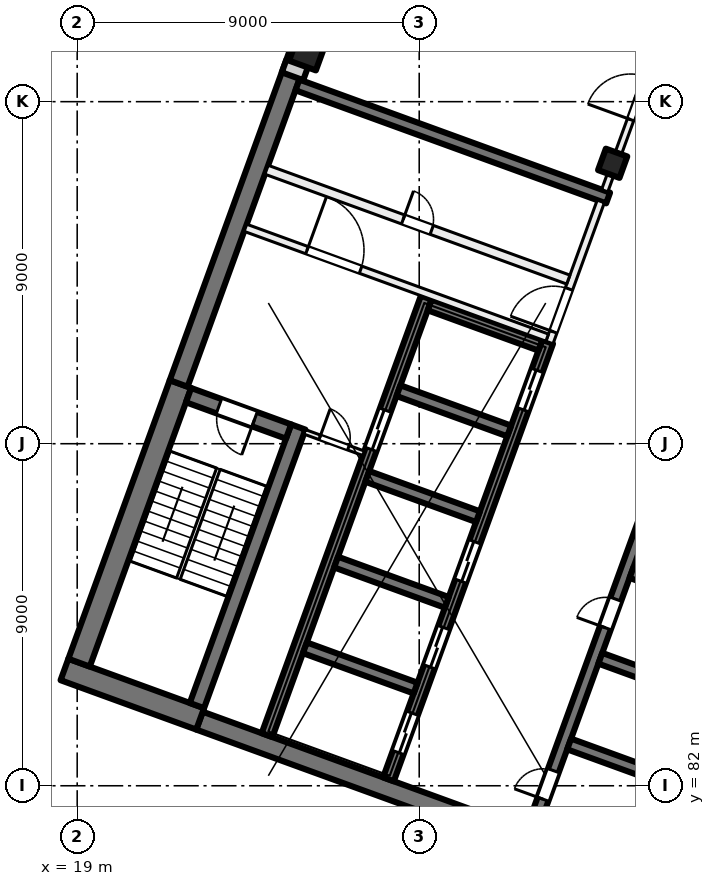
"""IFC4 building model, lengths in metres.
Left out: names, types, materials, properties, quantities, classifications, styles, units other than length and angle.
Written with IfcOpenShell. Run it as: python <this file> out.ifc"""

import sys

from ifc_helpers import new_model, si_unit, direction, frame, frame_2d, origin, origin_2d, place, context, subcontext, project, spatial, rectangle, extrude, element, fill, save


model = new_model("IFC4")
c1 = context("Model", 3, precision=1e-05, world=origin(), true_north=direction((0.0, 1.0)))
c2 = subcontext(c1, "Body", "Model", "MODEL_VIEW")
j1 = project(units=[si_unit("LENGTHUNIT", "METRE"), si_unit("PLANEANGLEUNIT", "RADIAN")], contexts=[c1])
p1 = place(None, origin())
s1 = spatial("IfcSite", under=j1, at=p1, CompositionType="ELEMENT")
p2 = place(p1, origin())
s2 = spatial("IfcBuilding", under=s1, at=p2, CompositionType="ELEMENT")
p3 = place(p2, frame((0.0, 0.0, 220.0)))
s3 = spatial("IfcBuildingStorey", under=s2, at=p3, CompositionType="ELEMENT", Elevation=220.0)
p4 = place(p3, frame((33.091, 98.379, 0.0), z_axis=(0.0, 0.0, 1.0), x_axis=(-0.342020143326, -0.939692620786, 0.0)))
e1 = element("IfcColumn", 1, at=p4, inside=s3, PredefinedType="COLUMN", context=c2, shape_type="SweptSolid", body=[
    extrude(rectangle(XDim=0.6, YDim=0.6, at=origin_2d()), origin(), (0.0, 0.0, 1.0), 4.0),
])
p5 = place(p3, frame((25.056, 101.303, 0.0), z_axis=(0.0, 0.0, 1.0), x_axis=(-0.342020143326, -0.939692620786, 0.0)))
e2 = element("IfcColumn", 2, at=p5, inside=s3, PredefinedType="COLUMN", context=c2, shape_type="SweptSolid", body=[
    extrude(rectangle(XDim=0.75, YDim=0.75, at=origin_2d()), origin(), (0.0, 0.0, 1.0), 4.0),
])
p6 = place(p3, frame((35.75, 78.788, 0.0), z_axis=(0.0, 0.0, 1.0), x_axis=(-0.939692894512, 0.342019391267, 0.0)))
e3 = element("IfcWall", 3, at=p6, inside=s3, PredefinedType="SHEAR", context=c2, shape_type="SweptSolid", body=[
    extrude(rectangle(XDim=14.4, YDim=0.5, at=frame_2d((7.2, 0.0))), origin(), (0.0, 0.0, 1.0), 4.0),
])
p7 = place(p3, frame((22.236, 83.76, 0.0), z_axis=(0.0, 0.0, 1.0), x_axis=(-0.939680822529, 0.342052557032, 0.0)))
e4 = element("IfcWall", 4, at=p7, inside=s3, PredefinedType="SHEAR", context=c2, shape_type="SweptSolid", body=[
    extrude(rectangle(XDim=3.8, YDim=0.6, at=frame_2d((1.9, 0.0))), origin(), (0.0, 0.0, 1.0), 4.0),
])
p8 = place(p3, frame((19.05, 85.239, 0.0), z_axis=(0.0, 0.0, 1.0), x_axis=(0.342016982193, 0.939693771338, 0.0)))
e5 = element("IfcWall", 5, at=p8, inside=s3, PredefinedType="SHEAR", context=c2, shape_type="SweptSolid", body=[
    extrude(rectangle(XDim=7.8, YDim=0.6, at=frame_2d((3.9, 0.0))), origin(), (0.0, 0.0, 1.0), 4.0),
])
p9 = place(p3, frame((21.67, 92.585, 0.0), z_axis=(0.0, 0.0, 1.0), x_axis=(0.342035714298, 0.93968695327, 0.0)))
e6 = element("IfcWall", 6, at=p9, inside=s3, PredefinedType="SHEAR", context=c2, shape_type="SweptSolid", body=[
    extrude(rectangle(XDim=8.975, YDim=0.5, at=frame_2d((4.488, 0.0))), origin(), (0.0, 0.0, 1.0), 4.0),
])
p10 = place(p3, frame((22.15, 84.11, 0.0), z_axis=(0.0, 0.0, 1.0), x_axis=(0.342016982193, 0.939693771338, 0.0)))
e7 = element("IfcWall", 7, at=p10, inside=s3, PredefinedType="SHEAR", context=c2, shape_type="SweptSolid", body=[
    extrude(rectangle(XDim=7.8, YDim=0.4, at=frame_2d((3.9, 0.0))), origin(), (0.0, 0.0, 1.0), 4.0),
])
p11 = place(p3, frame((24.562, 91.32, 0.0), z_axis=(0.0, 0.0, 1.0), x_axis=(-0.939717030584, 0.341953070509, 0.0)))
e8 = element("IfcWall", 8, at=p11, inside=s3, PredefinedType="SHEAR", context=c2, shape_type="SweptSolid", body=[
    extrude(rectangle(XDim=2.8, YDim=0.4, at=frame_2d((1.4, 0.0))), origin(), (0.0, 0.0, 1.0), 4.0),
])
p12 = place(p11, frame((0.95, 0.0, 0.0)))
e9 = element("IfcOpeningElement", 9, at=p12, cuts=e8, PredefinedType="OPENING", context=c2, shape_type="SweptSolid", body=[
    extrude(rectangle(XDim=1.0, YDim=2.1, at=frame_2d((0.5, 1.05))), frame((0.0, 0.21, 0.0), z_axis=(0.0, -1.0, 0.0), x_axis=(1.0, 0.0, 0.0)), (0.0, 0.0, 1.0), 0.42),
])
p13 = place(p3, frame((30.949, 80.801, 0.0), z_axis=(0.0, 0.0, 1.0), x_axis=(0.342016684409, 0.939693879721, 0.0)))
e10 = element("IfcWall", 10, at=p13, inside=s3, PredefinedType="SHEAR", context=c2, shape_type="SweptSolid", body=[
    extrude(rectangle(XDim=12.25, YDim=0.3, at=frame_2d((6.125, 0.0))), origin(), (0.0, 0.0, 1.0), 4.0),
])
p14 = place(p13, frame((0.9, 0.0, 0.0)))
e11 = element("IfcOpeningElement", 11, at=p14, cuts=e10, PredefinedType="OPENING", context=c2, shape_type="SweptSolid", body=[
    extrude(rectangle(XDim=0.8, YDim=2.1, at=frame_2d((0.4, 1.05))), frame((0.0, 0.16, 0.0), z_axis=(0.0, -1.0, 0.0), x_axis=(1.0, 0.0, 0.0)), (0.0, 0.0, 1.0), 0.32),
])
p15 = place(p13, frame((5.7, 0.0, 0.0)))
e12 = element("IfcOpeningElement", 12, at=p15, cuts=e10, PredefinedType="OPENING", context=c2, shape_type="SweptSolid", body=[
    extrude(rectangle(XDim=0.8, YDim=2.1, at=frame_2d((0.4, 1.05))), frame((0.0, 0.16, 0.0), z_axis=(0.0, -1.0, 0.0), x_axis=(1.0, 0.0, 0.0)), (0.0, 0.0, 1.0), 0.32),
])
p16 = place(p3, frame((34.858, 82.039, 0.0), z_axis=(0.0, 0.0, 1.0), x_axis=(-0.939689908313, 0.342027595692, 0.0)))
e13 = element("IfcWall", 13, at=p16, inside=s3, PredefinedType="SHEAR", context=c2, shape_type="SweptSolid", body=[
    extrude(rectangle(XDim=3.1, YDim=0.3, at=frame_2d((1.55, 0.0))), origin(), (0.0, 0.0, 1.0), 4.0),
])
p17 = place(p3, frame((35.679, 84.294, 0.0), z_axis=(0.0, 0.0, 1.0), x_axis=(-0.939706007505, 0.341983361377, 0.0)))
e14 = element("IfcWall", 14, at=p17, inside=s3, PredefinedType="SHEAR", context=c2, shape_type="SweptSolid", body=[
    extrude(rectangle(XDim=3.1, YDim=0.3, at=frame_2d((1.55, 0.0))), origin(), (0.0, 0.0, 1.0), 4.0),
])
p18 = place(p3, frame((36.5, 86.549, 0.0), z_axis=(0.0, 0.0, 1.0), x_axis=(-0.939689908313, 0.342027595692, 0.0)))
e15 = element("IfcWall", 15, at=p18, inside=s3, PredefinedType="SHEAR", context=c2, shape_type="SweptSolid", body=[
    extrude(rectangle(XDim=3.1, YDim=0.3, at=frame_2d((1.55, 0.0))), origin(), (0.0, 0.0, 1.0), 4.0),
])
p19 = place(p3, frame((27.191, 82.169, 0.0), z_axis=(0.0, 0.0, 1.0), x_axis=(0.342016684409, 0.939693879721, 0.0)))
e16 = element("IfcWall", 16, at=p19, inside=s3, PredefinedType="SHEAR", context=c2, shape_type="SweptSolid", body=[
    extrude(rectangle(XDim=12.25, YDim=0.3, at=frame_2d((6.125, 0.0))), origin(), (0.0, 0.0, 1.0), 4.0),
])
p20 = place(p19, frame((0.75, 0.0, 0.0)))
e17 = element("IfcOpeningElement", 17, at=p20, cuts=e16, PredefinedType="OPENING", context=c2, shape_type="SweptSolid", body=[
    extrude(rectangle(XDim=1.1, YDim=2.1, at=frame_2d((0.55, 1.05))), frame((0.0, 0.16, 0.0), z_axis=(0.0, -1.0, 0.0), x_axis=(1.0, 0.0, 0.0)), (0.0, 0.0, 1.0), 0.32),
])
p21 = place(p19, frame((3.15, 0.0, 0.0)))
e18 = element("IfcOpeningElement", 18, at=p21, cuts=e16, PredefinedType="OPENING", context=c2, shape_type="SweptSolid", body=[
    extrude(rectangle(XDim=1.1, YDim=2.1, at=frame_2d((0.55, 1.05))), frame((0.0, 0.16, 0.0), z_axis=(0.0, -1.0, 0.0), x_axis=(1.0, 0.0, 0.0)), (0.0, 0.0, 1.0), 0.32),
])
p22 = place(p19, frame((5.55, 0.0, 0.0)))
e19 = element("IfcOpeningElement", 19, at=p22, cuts=e16, PredefinedType="OPENING", context=c2, shape_type="SweptSolid", body=[
    extrude(rectangle(XDim=1.1, YDim=2.1, at=frame_2d((0.55, 1.05))), frame((0.0, 0.16, 0.0), z_axis=(0.0, -1.0, 0.0), x_axis=(1.0, 0.0, 0.0)), (0.0, 0.0, 1.0), 0.32),
])
p23 = place(p19, frame((10.35, 0.0, 0.0)))
e20 = element("IfcOpeningElement", 20, at=p23, cuts=e16, PredefinedType="OPENING", context=c2, shape_type="SweptSolid", body=[
    extrude(rectangle(XDim=1.1, YDim=2.1, at=frame_2d((0.55, 1.05))), frame((0.0, 0.16, 0.0), z_axis=(0.0, -1.0, 0.0), x_axis=(1.0, 0.0, 0.0)), (0.0, 0.0, 1.0), 0.32),
])
p24 = place(p3, frame((23.996, 83.332, 0.0), z_axis=(0.0, 0.0, 1.0), x_axis=(0.342016684409, 0.939693879721, 0.0)))
e21 = element("IfcWall", 21, at=p24, inside=s3, PredefinedType="SHEAR", context=c2, shape_type="SweptSolid", body=[
    extrude(rectangle(XDim=12.25, YDim=0.3, at=frame_2d((6.125, 0.0))), origin(), (0.0, 0.0, 1.0), 4.0),
])
p25 = place(p24, frame((8.0, 0.0, 0.0)))
e22 = element("IfcOpeningElement", 22, at=p25, cuts=e21, PredefinedType="OPENING", context=c2, shape_type="SweptSolid", body=[
    extrude(rectangle(XDim=1.1, YDim=2.1, at=frame_2d((0.55, 1.05))), frame((0.0, 0.16, 0.0), z_axis=(0.0, -1.0, 0.0), x_axis=(1.0, 0.0, 0.0)), (0.0, 0.0, 1.0), 0.32),
])
for number, where, z_axis, x_axis in (
    (23, (27.905, 84.57, 0.0), (0.0, 0.0, 1.0), (-0.94, 0.342, 0.0)),
    (24, (28.726, 86.825, 0.0), (0.0, 0.0, 1.0), (-0.94, 0.342, 0.0)),
    (25, (29.546, 89.08, 0.0), (0.0, 0.0, 1.0), (-0.94, 0.342, 0.0)),
):
    element("IfcWall", number, at=place(p3, frame(where, z_axis=z_axis, x_axis=x_axis)), inside=s3, PredefinedType="SHEAR", context=c2, shape_type="SweptSolid", body=[
        extrude(rectangle(XDim=3.1, YDim=0.3, at=frame_2d((1.55, 0.0))), origin(), (0.0, 0.0, 1.0), 4.0),
    ])
for number, where, z_axis, x_axis in (
    (26, (30.367, 91.336, 0.0), (0.0, 0.0, 1.0), (-0.94, 0.342, 0.0)),
    (27, (31.188, 93.591, 0.0), (0.0, 0.0, 1.0), (-0.94, 0.342, 0.0)),
):
    element("IfcWall", number, at=place(p3, frame(where, z_axis=z_axis, x_axis=x_axis)), inside=s3, PredefinedType="SHEAR", context=c2, shape_type="SweptSolid", body=[
        extrude(rectangle(XDim=3.1, YDim=0.3, at=frame_2d((1.55, 0.0))), origin(), (0.0, 0.0, 1.0), 4.0),
    ])
p26 = place(p3, frame((32.971, 97.465, 0.0), z_axis=(0.0, 0.0, 1.0), x_axis=(-0.939695066972, 0.34201342241, 0.0)))
e28 = element("IfcWall", 28, at=p26, inside=s3, PredefinedType="SHEAR", context=c2, shape_type="SweptSolid", body=[
    extrude(rectangle(XDim=8.7, YDim=0.3, at=frame_2d((4.35, 0.0))), origin(), (0.0, 0.0, 1.0), 4.0),
])
p27 = place(p3, frame((24.666, 100.669, 0.0), z_axis=(0.0, 0.0, 1.0), x_axis=(0.34201964167, 0.939692803373, 0.0)))
e29 = element("IfcWall", 29, at=p27, inside=s3, PredefinedType="SOLIDWALL", context=c2, shape_type="SweptSolid", body=[
    extrude(rectangle(XDim=32.884, YDim=0.6, at=frame_2d((16.442, 0.0))), origin(), (0.0, 0.0, 1.0), 3.625),
])
p28 = place(p27, frame((1.48, 0.0, 0.9)))
e30 = element("IfcOpeningElement", 30, at=p28, cuts=e29, PredefinedType="OPENING", context=c2, shape_type="SweptSolid", body=[
    extrude(rectangle(XDim=3.0, YDim=2.4, at=frame_2d((1.5, 1.2))), frame((0.0, 0.31, 0.0), z_axis=(0.0, -1.0, 0.0), x_axis=(1.0, 0.0, 0.0)), (0.0, 0.0, 1.0), 0.62),
])
p29 = place(p27, frame((5.98, 0.0, 0.9)))
e31 = element("IfcOpeningElement", 31, at=p29, cuts=e29, PredefinedType="OPENING", context=c2, shape_type="SweptSolid", body=[
    extrude(rectangle(XDim=3.0, YDim=2.4, at=frame_2d((1.5, 1.2))), frame((0.0, 0.31, 0.0), z_axis=(0.0, -1.0, 0.0), x_axis=(1.0, 0.0, 0.0)), (0.0, 0.0, 1.0), 0.62),
])
p30 = place(p27, frame((10.48, 0.0, 0.9)))
e32 = element("IfcOpeningElement", 32, at=p30, cuts=e29, PredefinedType="OPENING", context=c2, shape_type="SweptSolid", body=[
    extrude(rectangle(XDim=3.0, YDim=2.4, at=frame_2d((1.5, 1.2))), frame((0.0, 0.31, 0.0), z_axis=(0.0, -1.0, 0.0), x_axis=(1.0, 0.0, 0.0)), (0.0, 0.0, 1.0), 0.62),
])
p31 = place(p27, frame((14.98, 0.0, 0.9)))
e33 = element("IfcOpeningElement", 33, at=p31, cuts=e29, PredefinedType="OPENING", context=c2, shape_type="SweptSolid", body=[
    extrude(rectangle(XDim=3.0, YDim=2.4, at=frame_2d((1.5, 1.2))), frame((0.0, 0.31, 0.0), z_axis=(0.0, -1.0, 0.0), x_axis=(1.0, 0.0, 0.0)), (0.0, 0.0, 1.0), 0.62),
])
p32 = place(p27, frame((19.48, 0.0, 0.9)))
e34 = element("IfcOpeningElement", 34, at=p32, cuts=e29, PredefinedType="OPENING", context=c2, shape_type="SweptSolid", body=[
    extrude(rectangle(XDim=3.0, YDim=2.4, at=frame_2d((1.5, 1.2))), frame((0.0, 0.31, 0.0), z_axis=(0.0, -1.0, 0.0), x_axis=(1.0, 0.0, 0.0)), (0.0, 0.0, 1.0), 0.62),
])
p33 = place(p27, frame((23.98, 0.0, 0.9)))
e35 = element("IfcOpeningElement", 35, at=p33, cuts=e29, PredefinedType="OPENING", context=c2, shape_type="SweptSolid", body=[
    extrude(rectangle(XDim=3.0, YDim=2.4, at=frame_2d((1.5, 1.2))), frame((0.0, 0.31, 0.0), z_axis=(0.0, -1.0, 0.0), x_axis=(1.0, 0.0, 0.0)), (0.0, 0.0, 1.0), 0.62),
])
p34 = place(p27, frame((28.48, 0.0, 0.9)))
e36 = element("IfcOpeningElement", 36, at=p34, cuts=e29, PredefinedType="OPENING", context=c2, shape_type="SweptSolid", body=[
    extrude(rectangle(XDim=3.0, YDim=2.4, at=frame_2d((1.5, 1.2))), frame((0.0, 0.31, 0.0), z_axis=(0.0, -1.0, 0.0), x_axis=(1.0, 0.0, 0.0)), (0.0, 0.0, 1.0), 0.62),
])
p35 = place(p3, frame((31.427, 93.663, 0.0), z_axis=(0.0, 0.0, 1.0), x_axis=(0.342030870568, 0.93968871632, 0.0)))
e37 = element("IfcWall", 37, at=p35, inside=s3, PredefinedType="PARTITIONING", context=c2, shape_type="SweptSolid", body=[
    extrude(rectangle(XDim=3.95, YDim=0.2, at=frame_2d((1.975, 0.0))), origin(), (0.0, 0.0, 1.0), 3.625),
])
p36 = place(p35, frame((0.3, 0.0, 0.0)))
e38 = element("IfcOpeningElement", 38, at=p36, cuts=e37, PredefinedType="OPENING", context=c2, shape_type="SweptSolid", body=[
    extrude(rectangle(XDim=1.2, YDim=2.1, at=frame_2d((0.6, 1.05))), frame((0.0, 0.11, 0.0), z_axis=(0.0, -1.0, 0.0), x_axis=(1.0, 0.0, 0.0)), (0.0, 0.0, 1.0), 0.22),
])
p37 = place(p3, frame((23.427, 96.682, 0.0), z_axis=(0.0, 0.0, 1.0), x_axis=(0.939690465531, -0.342026064782, 0.0)))
e39 = element("IfcWall", 39, at=p37, inside=s3, PredefinedType="PARTITIONING", context=c2, shape_type="SweptSolid", body=[
    extrude(rectangle(XDim=8.45, YDim=0.2, at=frame_2d((4.225, 0.0))), origin(), (0.0, 0.0, 1.0), 3.625),
])
p38 = place(p37, frame((1.725, 0.0, 0.0)))
e40 = element("IfcOpeningElement", 40, at=p38, cuts=e39, PredefinedType="OPENING", context=c2, shape_type="SweptSolid", body=[
    extrude(rectangle(XDim=1.5, YDim=2.1, at=frame_2d((0.75, 1.05))), frame((0.0, 0.11, 0.0), z_axis=(0.0, -1.0, 0.0), x_axis=(1.0, 0.0, 0.0)), (0.0, 0.0, 1.0), 0.22),
])
p39 = place(p3, frame((23.983, 98.208, 0.0), z_axis=(0.0, 0.0, 1.0), x_axis=(0.939699751196, -0.342000552051, 0.0)))
e41 = element("IfcWall", 41, at=p39, inside=s3, PredefinedType="PARTITIONING", context=c2, shape_type="SweptSolid", body=[
    extrude(rectangle(XDim=8.45, YDim=0.25, at=frame_2d((4.225, 0.0))), origin(), (0.0, 0.0, 1.0), 3.625),
])
p40 = place(p39, frame((3.825, 0.0, 0.0)))
e42 = element("IfcOpeningElement", 42, at=p40, cuts=e41, PredefinedType="OPENING", context=c2, shape_type="SweptSolid", body=[
    extrude(rectangle(XDim=0.8, YDim=2.1, at=frame_2d((0.4, 1.05))), frame((0.0, 0.135, 0.0), z_axis=(0.0, -1.0, 0.0), x_axis=(1.0, 0.0, 0.0)), (0.0, 0.0, 1.0), 0.27),
])
p41 = place(p3, frame((24.985, 91.312, 0.0), z_axis=(0.0, 0.0, 1.0), x_axis=(0.939719959755, -0.341945020783, 0.0)))
e43 = element("IfcWall", 43, at=p41, inside=s3, PredefinedType="PARTITIONING", context=c2, shape_type="SweptSolid", body=[
    extrude(rectangle(XDim=1.65, YDim=0.125, at=frame_2d((0.825, 0.0))), origin(), (0.0, 0.0, 1.0), 3.625),
])
p42 = place(p41, frame((0.425, 0.0, 0.0)))
e44 = element("IfcOpeningElement", 44, at=p42, cuts=e43, PredefinedType="OPENING", context=c2, shape_type="SweptSolid", body=[
    extrude(rectangle(XDim=0.8, YDim=2.1, at=frame_2d((0.4, 1.05))), frame((0.0, 0.073, 0.0), z_axis=(0.0, -1.0, 0.0), x_axis=(1.0, 0.0, 0.0)), (0.0, 0.0, 1.0), 0.145),
])
p43 = place(p3, frame((32.881, 97.657, 0.0), z_axis=(0.0, 0.0, 1.0), x_axis=(0.342058204353, 0.939678766832, 0.0)))
e45 = element("IfcWall", 45, at=p43, inside=s3, PredefinedType="PARTITIONING", context=c2, shape_type="SweptSolid", body=[
    extrude(rectangle(XDim=5.163, YDim=0.175, at=frame_2d((2.581, 0.0))), origin(), (0.0, 0.0, 1.0), 3.625),
])
p44 = place(p43, frame((1.991, 0.0, 0.0)))
e46 = element("IfcOpeningElement", 46, at=p44, cuts=e45, PredefinedType="OPENING", context=c2, shape_type="SweptSolid", body=[
    extrude(rectangle(XDim=1.2, YDim=2.1, at=frame_2d((0.6, 1.05))), frame((0.0, 0.097, 0.0), z_axis=(0.0, -1.0, 0.0), x_axis=(1.0, 0.0, 0.0)), (0.0, 0.0, 1.0), 0.195),
])
p45 = place(p20, origin())
e47 = element("IfcDoor", 47, at=p45, inside=s3, OperationType="DOUBLE_DOOR_SLIDING", PredefinedType="DOOR", context=c2, shape_type="SweptSolid", body=[
    extrude(rectangle(XDim=1.1, YDim=2.1, at=frame_2d((0.55, 1.05))), frame((0.0, 0.025, 0.0), z_axis=(0.0, -1.0, 0.0), x_axis=(1.0, 0.0, 0.0)), (0.0, 0.0, 1.0), 0.05),
])
fill(e17, e47)
p46 = place(p21, origin())
e48 = element("IfcDoor", 48, at=p46, inside=s3, OperationType="DOUBLE_DOOR_SLIDING", PredefinedType="DOOR", context=c2, shape_type="SweptSolid", body=[
    extrude(rectangle(XDim=1.1, YDim=2.1, at=frame_2d((0.55, 1.05))), frame((0.0, 0.025, 0.0), z_axis=(0.0, -1.0, 0.0), x_axis=(1.0, 0.0, 0.0)), (0.0, 0.0, 1.0), 0.05),
])
fill(e18, e48)
p47 = place(p22, origin())
e49 = element("IfcDoor", 49, at=p47, inside=s3, OperationType="DOUBLE_DOOR_SLIDING", PredefinedType="DOOR", context=c2, shape_type="SweptSolid", body=[
    extrude(rectangle(XDim=1.1, YDim=2.1, at=frame_2d((0.55, 1.05))), frame((0.0, 0.025, 0.0), z_axis=(0.0, -1.0, 0.0), x_axis=(1.0, 0.0, 0.0)), (0.0, 0.0, 1.0), 0.05),
])
fill(e19, e49)
p48 = place(p23, origin())
e50 = element("IfcDoor", 50, at=p48, inside=s3, OperationType="DOUBLE_DOOR_SLIDING", PredefinedType="DOOR", context=c2, shape_type="SweptSolid", body=[
    extrude(rectangle(XDim=1.1, YDim=2.1, at=frame_2d((0.55, 1.05))), frame((0.0, 0.025, 0.0), z_axis=(0.0, -1.0, 0.0), x_axis=(1.0, 0.0, 0.0)), (0.0, 0.0, 1.0), 0.05),
])
fill(e20, e50)
p49 = place(p14, origin())
e51 = element("IfcDoor", 51, at=p49, inside=s3, OperationType="SINGLE_SWING_LEFT", PredefinedType="DOOR", context=c2, shape_type="SweptSolid", body=[
    extrude(rectangle(XDim=0.8, YDim=2.1, at=frame_2d((0.4, 1.05))), frame((0.0, 0.025, 0.0), z_axis=(0.0, -1.0, 0.0), x_axis=(1.0, 0.0, 0.0)), (0.0, 0.0, 1.0), 0.05),
])
fill(e11, e51)
p50 = place(p15, origin())
e52 = element("IfcDoor", 52, at=p50, inside=s3, OperationType="SINGLE_SWING_RIGHT", PredefinedType="DOOR", context=c2, shape_type="SweptSolid", body=[
    extrude(rectangle(XDim=0.8, YDim=2.1, at=frame_2d((0.4, 1.05))), frame((0.0, 0.025, 0.0), z_axis=(0.0, -1.0, 0.0), x_axis=(1.0, 0.0, 0.0)), (0.0, 0.0, 1.0), 0.05),
])
fill(e12, e52)
p51 = place(p36, origin())
e53 = element("IfcDoor", 53, at=p51, inside=s3, OperationType="DOUBLE_DOOR_SINGLE_SWING", PredefinedType="DOOR", context=c2, shape_type="SweptSolid", body=[
    extrude(rectangle(XDim=1.2, YDim=2.1, at=frame_2d((0.6, 1.05))), frame((0.0, 0.025, 0.0), z_axis=(0.0, -1.0, 0.0), x_axis=(1.0, 0.0, 0.0)), (0.0, 0.0, 1.0), 0.05),
])
fill(e38, e53)
p52 = place(p38, origin())
e54 = element("IfcDoor", 54, at=p52, inside=s3, OperationType="DOUBLE_DOOR_SINGLE_SWING", PredefinedType="DOOR", context=c2, shape_type="SweptSolid", body=[
    extrude(rectangle(XDim=1.5, YDim=2.1, at=frame_2d((0.75, 1.05))), frame((0.0, 0.025, 0.0), z_axis=(0.0, -1.0, 0.0), x_axis=(1.0, 0.0, 0.0)), (0.0, 0.0, 1.0), 0.05),
])
fill(e40, e54)
p53 = place(p12, origin())
e55 = element("IfcDoor", 55, at=p53, inside=s3, OperationType="SINGLE_SWING_LEFT", PredefinedType="DOOR", context=c2, shape_type="SweptSolid", body=[
    extrude(rectangle(XDim=1.0, YDim=2.1, at=frame_2d((0.5, 1.05))), frame((0.0, 0.025, 0.0), z_axis=(0.0, -1.0, 0.0), x_axis=(1.0, 0.0, 0.0)), (0.0, 0.0, 1.0), 0.05),
])
fill(e9, e55)
p54 = place(p42, origin())
e56 = element("IfcDoor", 56, at=p54, inside=s3, OperationType="SINGLE_SWING_RIGHT", PredefinedType="DOOR", context=c2, shape_type="SweptSolid", body=[
    extrude(rectangle(XDim=0.8, YDim=2.1, at=frame_2d((0.4, 1.05))), frame((0.0, 0.025, 0.0), z_axis=(0.0, -1.0, 0.0), x_axis=(1.0, 0.0, 0.0)), (0.0, 0.0, 1.0), 0.05),
])
fill(e44, e56)
p55 = place(p40, origin())
e57 = element("IfcDoor", 57, at=p55, inside=s3, OperationType="SINGLE_SWING_LEFT", PredefinedType="DOOR", context=c2, shape_type="SweptSolid", body=[
    extrude(rectangle(XDim=0.8, YDim=2.1, at=frame_2d((0.4, 1.05))), frame((0.0, 0.025, 0.0), z_axis=(0.0, -1.0, 0.0), x_axis=(1.0, 0.0, 0.0)), (0.0, 0.0, 1.0), 0.05),
])
fill(e42, e57)
p56 = place(p25, origin())
e58 = element("IfcDoor", 58, at=p56, inside=s3, OperationType="DOUBLE_DOOR_SLIDING", PredefinedType="DOOR", context=c2, shape_type="SweptSolid", body=[
    extrude(rectangle(XDim=1.1, YDim=2.1, at=frame_2d((0.55, 1.05))), frame((0.0, 0.025, 0.0), z_axis=(0.0, -1.0, 0.0), x_axis=(1.0, 0.0, 0.0)), (0.0, 0.0, 1.0), 0.05),
])
fill(e22, e58)
p57 = place(p44, origin())
e59 = element("IfcDoor", 59, at=p57, inside=s3, OperationType="DOUBLE_DOOR_SINGLE_SWING", PredefinedType="DOOR", context=c2, shape_type="SweptSolid", body=[
    extrude(rectangle(XDim=1.2, YDim=2.1, at=frame_2d((0.6, 1.05))), frame((0.0, 0.025, 0.0), z_axis=(0.0, -1.0, 0.0), x_axis=(1.0, 0.0, 0.0)), (0.0, 0.0, 1.0), 0.05),
])
fill(e46, e59)
save(model, sys.argv[1])
